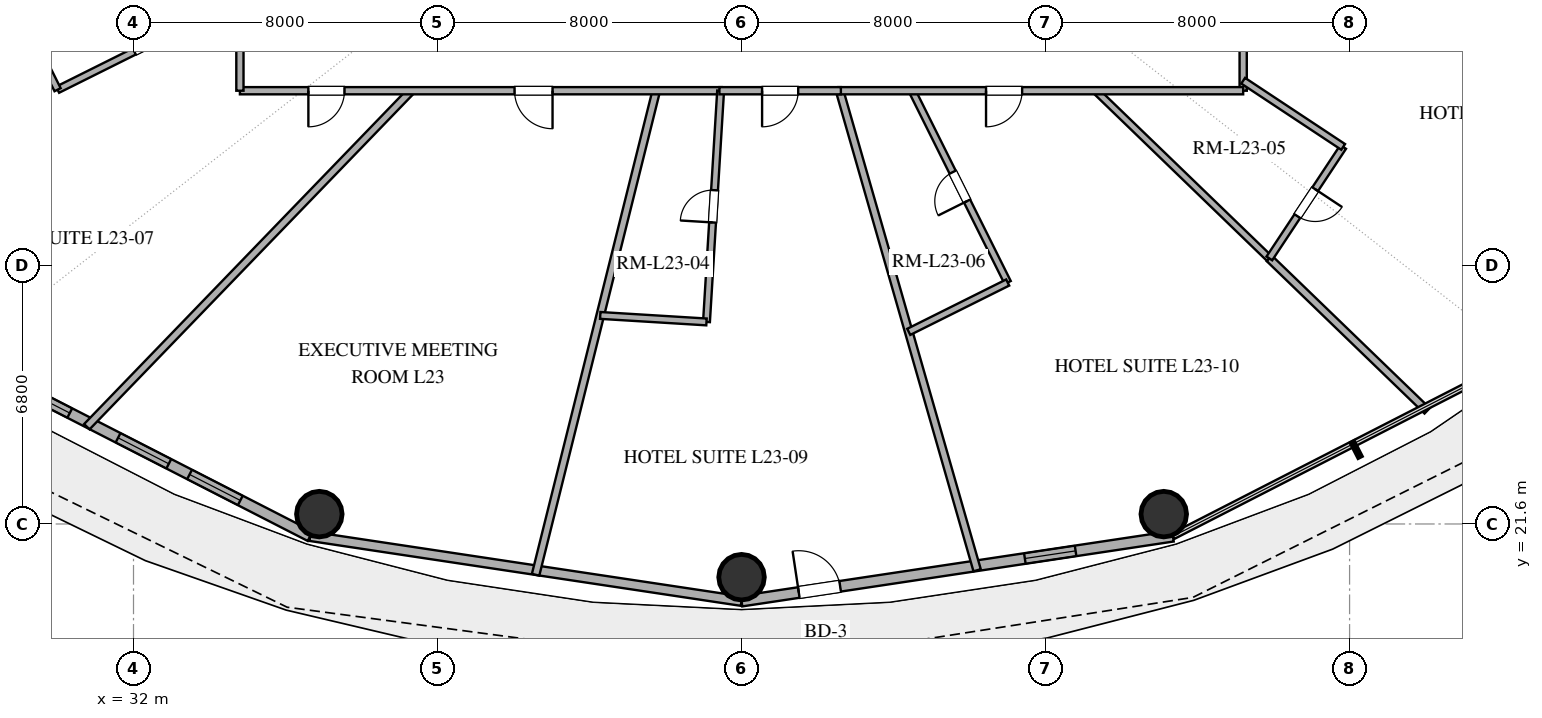
"""IFC4 building model, lengths in metres.
Left out: names, types, materials, properties, quantities, classifications, styles, units other than length and angle.
Written with IfcOpenShell. Run it as: python <this file> out.ifc"""

import sys

from ifc_helpers import new_model, si_unit, direction, frame, frame_2d, origin, origin_2d, place, context, subcontext, project, spatial, rectangle, hollow_circle, extrude, element, fill, save


model = new_model("IFC4")
c1 = context("Model", 3, precision=1e-05, world=origin(), true_north=direction((0.0, 1.0)))
c2 = subcontext(c1, "Body", "Model", "MODEL_VIEW")
j1 = project(units=[si_unit("LENGTHUNIT", "METRE"), si_unit("PLANEANGLEUNIT", "RADIAN")], contexts=[c1])
p1 = place(None, origin())
s1 = spatial("IfcSite", under=j1, at=p1, CompositionType="ELEMENT")
p2 = place(p1, origin())
s2 = spatial("IfcBuilding", under=s1, at=p2, CompositionType="ELEMENT")
p3 = place(p2, frame((0.0, 0.0, 94.8)))
s3 = spatial("IfcBuildingStorey", under=s2, at=p3, CompositionType="ELEMENT", Elevation=94.8)
for number, where, z_axis, x_axis in (
    (1, (36.89, 21.859, 0.0), (0.0, 0.0, 1.0), (1.0, 0.0, 0.0)),
    (2, (48.0, 20.2, 0.0), (0.0, 0.0, 1.0), (1.0, 0.0, 0.0)),
    (3, (59.11, 21.859, 0.0), (0.0, 0.0, 1.0), (1.0, 0.0, 0.0)),
):
    element("IfcColumn", number, at=place(p3, frame(where, z_axis=z_axis, x_axis=x_axis)), inside=s3, PredefinedType="COLUMN", context=c2, shape_type="SweptSolid", body=[
        extrude(hollow_circle(Radius=0.6, WallThickness=0.032, at=origin_2d()), origin(), (0.0, 0.0, 1.0), 3.38),
    ])
p4 = place(p3, frame((27.16, 26.14, 0.0), z_axis=(0.0, 0.0, 1.0), x_axis=(0.889959505023, -0.45603955905, 0.0)))
e4 = element("IfcWall", 4, at=p4, inside=s3, PredefinedType="SOLIDWALL", context=c2, shape_type="SweptSolid", body=[
    extrude(rectangle(XDim=10.662, YDim=0.28, at=frame_2d((5.331, 0.0))), origin(), (0.0, 0.0, 1.0), 3.38),
])
p5 = place(p4, frame((1.904, 0.0, 0.85)))
e5 = element("IfcOpeningElement", 5, at=p5, cuts=e4, PredefinedType="OPENING", context=c2, shape_type="SweptSolid", body=[
    extrude(rectangle(XDim=1.65, YDim=2.0, at=frame_2d((0.825, 1.0))), frame((0.0, 0.15, 0.0), z_axis=(0.0, -1.0, 0.0), x_axis=(1.0, 0.0, 0.0)), (0.0, 0.0, 1.0), 0.3),
])
p6 = place(p4, frame((4.982, 0.0, 0.85)))
e6 = element("IfcOpeningElement", 6, at=p6, cuts=e4, PredefinedType="OPENING", context=c2, shape_type="SweptSolid", body=[
    extrude(rectangle(XDim=1.5, YDim=2.0, at=frame_2d((0.75, 1.0))), frame((0.0, 0.15, 0.0), z_axis=(0.0, -1.0, 0.0), x_axis=(1.0, 0.0, 0.0)), (0.0, 0.0, 1.0), 0.3),
])
p7 = place(p4, frame((7.096, 0.0, 0.85)))
e7 = element("IfcOpeningElement", 7, at=p7, cuts=e4, PredefinedType="OPENING", context=c2, shape_type="SweptSolid", body=[
    extrude(rectangle(XDim=1.5, YDim=2.0, at=frame_2d((0.75, 1.0))), frame((0.0, 0.15, 0.0), z_axis=(0.0, -1.0, 0.0), x_axis=(1.0, 0.0, 0.0)), (0.0, 0.0, 1.0), 0.3),
])
p8 = place(p3, frame((36.649, 21.277, 0.0), z_axis=(0.0, 0.0, 1.0), x_axis=(0.988877774656, -0.148730450117, 0.0)))
e8 = element("IfcWall", 8, at=p8, inside=s3, PredefinedType="SOLIDWALL", context=c2, shape_type="SweptSolid", body=[
    extrude(rectangle(XDim=11.479, YDim=0.25, at=frame_2d((5.74, 0.0))), origin(), (0.0, 0.0, 1.0), 3.38),
])
p9 = place(p3, frame((48.0, 19.57, 0.0), z_axis=(0.0, 0.0, 1.0), x_axis=(0.988877774656, 0.148730450117, 0.0)))
e9 = element("IfcWall", 9, at=p9, inside=s3, PredefinedType="SOLIDWALL", context=c2, shape_type="SweptSolid", body=[
    extrude(rectangle(XDim=11.479, YDim=0.28, at=frame_2d((5.74, 0.0))), origin(), (0.0, 0.0, 1.0), 3.38),
])
p10 = place(p9, frame((1.524, 0.0, 0.0)))
e10 = element("IfcOpeningElement", 10, at=p10, cuts=e9, PredefinedType="OPENING", context=c2, shape_type="SweptSolid", body=[
    extrude(rectangle(XDim=1.1, YDim=2.25, at=frame_2d((0.55, 1.125))), frame((0.0, 0.15, 0.0), z_axis=(0.0, -1.0, 0.0), x_axis=(1.0, 0.0, 0.0)), (0.0, 0.0, 1.0), 0.3),
])
p11 = place(p9, frame((7.539, 0.0, 0.85)))
e11 = element("IfcOpeningElement", 11, at=p11, cuts=e9, PredefinedType="OPENING", context=c2, shape_type="SweptSolid", body=[
    extrude(rectangle(XDim=1.35, YDim=1.8, at=frame_2d((0.675, 0.9))), frame((0.0, 0.15, 0.0), z_axis=(0.0, -1.0, 0.0), x_axis=(1.0, 0.0, 0.0)), (0.0, 0.0, 1.0), 0.3),
])
p12 = place(p3, frame((30.772, 24.16, 0.0), z_axis=(0.0, 0.0, 1.0), x_axis=(0.694672506389, 0.719326149161, 0.0)))
e12 = element("IfcWall", 12, at=p12, inside=s3, PredefinedType="PARTITIONING", context=c2, shape_type="SweptSolid", body=[
    extrude(rectangle(XDim=12.289, YDim=0.2, at=frame_2d((6.145, 0.0))), origin(), (0.0, 0.0, 1.0), 2.74),
])
p13 = place(p3, frame((45.756, 33.0, 0.0), z_axis=(0.0, 0.0, 1.0), x_axis=(-0.241918476077, -0.970296578852, 0.0)))
e13 = element("IfcWall", 13, at=p13, inside=s3, PredefinedType="PARTITIONING", context=c2, shape_type="SweptSolid", body=[
    extrude(rectangle(XDim=13.125, YDim=0.2, at=frame_2d((6.563, 0.0))), origin(), (0.0, 0.0, 1.0), 2.74),
])
p14 = place(p3, frame((50.581, 33.0, 0.0), z_axis=(0.0, 0.0, 1.0), x_axis=(0.275639731411, -0.961261014745, 0.0)))
e14 = element("IfcWall", 14, at=p14, inside=s3, PredefinedType="PARTITIONING", context=c2, shape_type="SweptSolid", body=[
    extrude(rectangle(XDim=13.126, YDim=0.2, at=frame_2d((6.563, 0.0))), origin(), (0.0, 0.0, 1.0), 2.74),
])
p15 = place(p3, frame((47.482, 33.0, 0.0), z_axis=(0.0, 0.0, 1.0), x_axis=(-1.0, 0.0, 0.0)))
e15 = element("IfcWall", 15, at=p15, inside=s3, PredefinedType="PARTITIONING", context=c2, shape_type="SweptSolid", body=[
    extrude(rectangle(XDim=12.682, YDim=0.19, at=frame_2d((6.341, 0.0))), origin(), (0.0, 0.0, 1.0), 2.74),
])
p16 = place(p15, frame((4.455, 0.0, 0.0)))
e16 = element("IfcOpeningElement", 16, at=p16, cuts=e15, PredefinedType="OPENING", context=c2, shape_type="SweptSolid", body=[
    extrude(rectangle(XDim=1.0, YDim=2.2, at=frame_2d((0.5, 1.1))), frame((0.0, 0.105, 0.0), z_axis=(0.0, -1.0, 0.0), x_axis=(1.0, 0.0, 0.0)), (0.0, 0.0, 1.0), 0.21),
])
p17 = place(p15, frame((9.93, 0.0, 0.0)))
e17 = element("IfcOpeningElement", 17, at=p17, cuts=e15, PredefinedType="OPENING", context=c2, shape_type="SweptSolid", body=[
    extrude(rectangle(XDim=0.95, YDim=2.15, at=frame_2d((0.475, 1.075))), frame((0.0, 0.105, 0.0), z_axis=(0.0, -1.0, 0.0), x_axis=(1.0, 0.0, 0.0)), (0.0, 0.0, 1.0), 0.21),
])
p18 = place(p3, frame((61.889, 28.587, 0.0), z_axis=(0.0, 0.0, 1.0), x_axis=(-0.719318009274, 0.694680935059, 0.0)))
e18 = element("IfcWall", 18, at=p18, inside=s3, PredefinedType="PLUMBINGWALL", context=c2, shape_type="SweptSolid", body=[
    extrude(rectangle(XDim=6.352, YDim=0.18, at=frame_2d((3.176, 0.0))), origin(), (0.0, 0.0, 1.0), 2.74),
])
p19 = place(p3, frame((47.077, 26.916, 0.0), z_axis=(0.0, 0.0, 1.0), x_axis=(0.061044096749, 0.998135070144, 0.0)))
e19 = element("IfcWall", 19, at=p19, inside=s3, PredefinedType="PLUMBINGWALL", context=c2, shape_type="SweptSolid", body=[
    extrude(rectangle(XDim=6.095, YDim=0.18, at=frame_2d((3.048, 0.0))), origin(), (0.0, 0.0, 1.0), 2.74),
])
p20 = place(p19, frame((2.623, 0.0, 0.0)))
e20 = element("IfcOpeningElement", 20, at=p20, cuts=e19, PredefinedType="OPENING", context=c2, shape_type="SweptSolid", body=[
    extrude(rectangle(XDim=0.85, YDim=2.1, at=frame_2d((0.425, 1.05))), frame((0.0, 0.1, 0.0), z_axis=(0.0, -1.0, 0.0), x_axis=(1.0, 0.0, 0.0)), (0.0, 0.0, 1.0), 0.2),
])
p21 = place(p3, frame((66.041, 24.578, 0.0), z_axis=(0.0, 0.0, 1.0), x_axis=(-0.719370121813, 0.694626970281, 0.0)))
e21 = element("IfcWall", 21, at=p21, inside=s3, PredefinedType="PARTITIONING", context=c2, shape_type="SweptSolid", body=[
    extrude(rectangle(XDim=5.772, YDim=0.2, at=frame_2d((2.886, 0.0))), origin(), (0.0, 0.0, 1.0), 2.74),
])
p22 = place(p3, frame((55.003, 27.953, 0.0), z_axis=(0.0, 0.0, 1.0), x_axis=(-0.446174269641, 0.894946099556, 0.0)))
e22 = element("IfcWall", 22, at=p22, inside=s3, PredefinedType="PLUMBINGWALL", context=c2, shape_type="SweptSolid", body=[
    extrude(rectangle(XDim=5.639, YDim=0.18, at=frame_2d((2.82, 0.0))), origin(), (0.0, 0.0, 1.0), 2.74),
])
p23 = place(p22, frame((2.395, 0.0, 0.0)))
e23 = element("IfcOpeningElement", 23, at=p23, cuts=e22, PredefinedType="OPENING", context=c2, shape_type="SweptSolid", body=[
    extrude(rectangle(XDim=0.85, YDim=2.1, at=frame_2d((0.425, 1.05))), frame((0.0, 0.1, 0.0), z_axis=(0.0, -1.0, 0.0), x_axis=(1.0, 0.0, 0.0)), (0.0, 0.0, 1.0), 0.2),
])
p24 = place(p3, frame((61.2, 41.225, 0.0), z_axis=(0.0, 0.0, 1.0), x_axis=(0.0, -1.0, 0.0)))
e24 = element("IfcWall", 24, at=p24, inside=s3, PredefinedType="PARTITIONING", context=c2, shape_type="SweptSolid", body=[
    extrude(rectangle(XDim=8.225, YDim=0.19, at=frame_2d((4.112, 0.0))), origin(), (0.0, 0.0, 1.0), 2.74),
])
p25 = place(p24, frame((4.767, 0.0, 0.0)))
e25 = element("IfcOpeningElement", 25, at=p25, cuts=e24, PredefinedType="OPENING", context=c2, shape_type="SweptSolid", body=[
    extrude(rectangle(XDim=0.95, YDim=2.15, at=frame_2d((0.475, 1.075))), frame((0.0, 0.105, 0.0), z_axis=(0.0, -1.0, 0.0), x_axis=(1.0, 0.0, 0.0)), (0.0, 0.0, 1.0), 0.21),
])
p26 = place(p3, frame((30.002, 33.027, 0.0), z_axis=(0.0, 0.0, 1.0), x_axis=(0.894936648514, 0.446193226244, 0.0)))
e26 = element("IfcWall", 26, at=p26, inside=s3, PredefinedType="PLUMBINGWALL", context=c2, shape_type="SweptSolid", body=[
    extrude(rectangle(XDim=5.361, YDim=0.18, at=frame_2d((2.681, 0.0))), origin(), (0.0, 0.0, 1.0), 2.74),
])
p27 = place(p26, frame((2.256, 0.0, 0.0)))
e27 = element("IfcOpeningElement", 27, at=p27, cuts=e26, PredefinedType="OPENING", context=c2, shape_type="SweptSolid", body=[
    extrude(rectangle(XDim=0.85, YDim=2.1, at=frame_2d((0.425, 1.05))), frame((0.0, 0.1, 0.0), z_axis=(0.0, -1.0, 0.0), x_axis=(1.0, 0.0, 0.0)), (0.0, 0.0, 1.0), 0.2),
])
p28 = place(p3, frame((61.2, 33.0, 0.0), z_axis=(0.0, 0.0, 1.0), x_axis=(-1.0, 0.0, 0.0)))
e28 = element("IfcWall", 28, at=p28, inside=s3, PredefinedType="PARTITIONING", context=c2, shape_type="SweptSolid", body=[
    extrude(rectangle(XDim=10.653, YDim=0.19, at=frame_2d((5.326, 0.0))), origin(), (0.0, 0.0, 1.0), 2.74),
])
p29 = place(p28, frame((5.816, 0.0, 0.0)))
e29 = element("IfcOpeningElement", 29, at=p29, cuts=e28, PredefinedType="OPENING", context=c2, shape_type="SweptSolid", body=[
    extrude(rectangle(XDim=0.95, YDim=2.15, at=frame_2d((0.475, 1.075))), frame((0.0, 0.105, 0.0), z_axis=(0.0, -1.0, 0.0), x_axis=(1.0, 0.0, 0.0)), (0.0, 0.0, 1.0), 0.21),
])
p30 = place(p3, frame((34.8, 33.0, 0.0), z_axis=(0.0, 0.0, 1.0), x_axis=(0.0, 1.0, 0.0)))
e30 = element("IfcWall", 30, at=p30, inside=s3, PredefinedType="PARTITIONING", context=c2, shape_type="SweptSolid", body=[
    extrude(rectangle(XDim=9.839, YDim=0.19, at=frame_2d((4.92, 0.0))), origin(), (0.0, 0.0, 1.0), 2.74),
])
p31 = place(p30, frame((7.035, 0.0, 0.0)))
e31 = element("IfcOpeningElement", 31, at=p31, cuts=e30, PredefinedType="OPENING", context=c2, shape_type="SweptSolid", body=[
    extrude(rectangle(XDim=0.95, YDim=2.15, at=frame_2d((0.475, 1.075))), frame((0.0, 0.105, 0.0), z_axis=(0.0, -1.0, 0.0), x_axis=(1.0, 0.0, 0.0)), (0.0, 0.0, 1.0), 0.21),
])
p32 = place(p3, frame((28.339, 36.362, 0.0), z_axis=(0.0, 0.0, 1.0), x_axis=(0.446243949247, -0.894911357488, 0.0)))
e32 = element("IfcWall", 32, at=p32, inside=s3, PredefinedType="PLUMBINGWALL", context=c2, shape_type="SweptSolid", body=[
    extrude(rectangle(XDim=3.727, YDim=0.18, at=frame_2d((1.864, 0.0))), origin(), (0.0, 0.0, 1.0), 2.74),
])
p33 = place(p3, frame((63.831, 31.521, 0.0), z_axis=(0.0, 0.0, 1.0), x_axis=(-0.551959146688, -0.833871153349, 0.0)))
e33 = element("IfcWall", 33, at=p33, inside=s3, PredefinedType="PLUMBINGWALL", context=c2, shape_type="SweptSolid", body=[
    extrude(rectangle(XDim=3.519, YDim=0.18, at=frame_2d((1.759, 0.0))), origin(), (0.0, 0.0, 1.0), 2.74),
])
p34 = place(p33, frame((1.334, 0.0, 0.0)))
e34 = element("IfcOpeningElement", 34, at=p34, cuts=e33, PredefinedType="OPENING", context=c2, shape_type="SweptSolid", body=[
    extrude(rectangle(XDim=0.85, YDim=2.1, at=frame_2d((0.425, 1.05))), frame((0.0, 0.1, 0.0), z_axis=(0.0, -1.0, 0.0), x_axis=(1.0, 0.0, 0.0)), (0.0, 0.0, 1.0), 0.2),
])
p35 = place(p3, frame((50.614, 33.0, 0.0), z_axis=(0.0, 0.0, 1.0), x_axis=(-1.0, 0.0, 0.0)))
e35 = element("IfcWall", 35, at=p35, inside=s3, PredefinedType="PARTITIONING", context=c2, shape_type="SweptSolid", body=[
    extrude(rectangle(XDim=3.197, YDim=0.19, at=frame_2d((1.598, 0.0))), origin(), (0.0, 0.0, 1.0), 2.74),
])
p36 = place(p35, frame((1.123, 0.0, 0.0)))
e36 = element("IfcOpeningElement", 36, at=p36, cuts=e35, PredefinedType="OPENING", context=c2, shape_type="SweptSolid", body=[
    extrude(rectangle(XDim=0.95, YDim=2.15, at=frame_2d((0.475, 1.075))), frame((0.0, 0.105, 0.0), z_axis=(0.0, -1.0, 0.0), x_axis=(1.0, 0.0, 0.0)), (0.0, 0.0, 1.0), 0.21),
])
p37 = place(p3, frame((61.2, 33.263, 0.0), z_axis=(0.0, 0.0, 1.0), x_axis=(0.833855219674, -0.5519832177, 0.0)))
e37 = element("IfcWall", 37, at=p37, inside=s3, PredefinedType="PLUMBINGWALL", context=c2, shape_type="SweptSolid", body=[
    extrude(rectangle(XDim=3.155, YDim=0.18, at=frame_2d((1.578, 0.0))), origin(), (0.0, 0.0, 1.0), 2.74),
])
p38 = place(p3, frame((52.4, 26.655, 0.0), z_axis=(0.0, 0.0, 1.0), x_axis=(0.894913437672, 0.446239777558, 0.0)))
e38 = element("IfcWall", 38, at=p38, inside=s3, PredefinedType="PLUMBINGWALL", context=c2, shape_type="SweptSolid", body=[
    extrude(rectangle(XDim=2.909, YDim=0.18, at=frame_2d((1.455, 0.0))), origin(), (0.0, 0.0, 1.0), 2.74),
])
p39 = place(p3, frame((44.282, 27.087, 0.0), z_axis=(0.0, 0.0, 1.0), x_axis=(0.998136779925, -0.061016133608, 0.0)))
e39 = element("IfcWall", 39, at=p39, inside=s3, PredefinedType="PLUMBINGWALL", context=c2, shape_type="SweptSolid", body=[
    extrude(rectangle(XDim=2.801, YDim=0.18, at=frame_2d((1.4, 0.0))), origin(), (0.0, 0.0, 1.0), 2.74),
])
p40 = place(p5, origin())
e40 = element("IfcWindow", 40, at=p40, inside=s3, PartitioningType="SINGLE_PANEL", PredefinedType="WINDOW", context=c2, shape_type="SweptSolid", body=[
    extrude(rectangle(XDim=1.65, YDim=2.0, at=frame_2d((0.825, 1.0))), frame((0.0, 0.03, 0.0), z_axis=(0.0, -1.0, 0.0), x_axis=(1.0, 0.0, 0.0)), (0.0, 0.0, 1.0), 0.06),
])
fill(e5, e40)
p41 = place(p6, origin())
e41 = element("IfcWindow", 41, at=p41, inside=s3, PartitioningType="SINGLE_PANEL", PredefinedType="WINDOW", context=c2, shape_type="SweptSolid", body=[
    extrude(rectangle(XDim=1.5, YDim=2.0, at=frame_2d((0.75, 1.0))), frame((0.0, 0.03, 0.0), z_axis=(0.0, -1.0, 0.0), x_axis=(1.0, 0.0, 0.0)), (0.0, 0.0, 1.0), 0.06),
])
fill(e6, e41)
p42 = place(p7, origin())
e42 = element("IfcWindow", 42, at=p42, inside=s3, PartitioningType="SINGLE_PANEL", PredefinedType="WINDOW", context=c2, shape_type="SweptSolid", body=[
    extrude(rectangle(XDim=1.5, YDim=2.0, at=frame_2d((0.75, 1.0))), frame((0.0, 0.03, 0.0), z_axis=(0.0, -1.0, 0.0), x_axis=(1.0, 0.0, 0.0)), (0.0, 0.0, 1.0), 0.06),
])
fill(e7, e42)
p43 = place(p10, origin())
e43 = element("IfcDoor", 43, at=p43, inside=s3, OperationType="SINGLE_SWING_LEFT", PredefinedType="DOOR", context=c2, shape_type="SweptSolid", body=[
    extrude(rectangle(XDim=1.1, YDim=2.25, at=frame_2d((0.55, 1.125))), frame((0.0, 0.025, 0.0), z_axis=(0.0, -1.0, 0.0), x_axis=(1.0, 0.0, 0.0)), (0.0, 0.0, 1.0), 0.05),
])
fill(e10, e43)
p44 = place(p11, origin())
e44 = element("IfcWindow", 44, at=p44, inside=s3, PartitioningType="SINGLE_PANEL", PredefinedType="WINDOW", context=c2, shape_type="SweptSolid", body=[
    extrude(rectangle(XDim=1.35, YDim=1.8, at=frame_2d((0.675, 0.9))), frame((0.0, 0.03, 0.0), z_axis=(0.0, -1.0, 0.0), x_axis=(1.0, 0.0, 0.0)), (0.0, 0.0, 1.0), 0.06),
])
fill(e11, e44)
p45 = place(p16, origin())
e45 = element("IfcDoor", 45, at=p45, inside=s3, OperationType="SINGLE_SWING_LEFT", PredefinedType="DOOR", context=c2, shape_type="SweptSolid", body=[
    extrude(rectangle(XDim=1.0, YDim=2.2, at=frame_2d((0.5, 1.1))), frame((0.0, 0.025, 0.0), z_axis=(0.0, -1.0, 0.0), x_axis=(1.0, 0.0, 0.0)), (0.0, 0.0, 1.0), 0.05),
])
fill(e16, e45)
p46 = place(p17, origin())
e46 = element("IfcDoor", 46, at=p46, inside=s3, OperationType="SINGLE_SWING_RIGHT", PredefinedType="DOOR", context=c2, shape_type="SweptSolid", body=[
    extrude(rectangle(XDim=0.95, YDim=2.15, at=frame_2d((0.475, 1.075))), frame((0.0, 0.025, 0.0), z_axis=(0.0, -1.0, 0.0), x_axis=(1.0, 0.0, 0.0)), (0.0, 0.0, 1.0), 0.05),
])
fill(e17, e46)
p47 = place(p20, origin())
e47 = element("IfcDoor", 47, at=p47, inside=s3, OperationType="SINGLE_SWING_LEFT", PredefinedType="DOOR", context=c2, shape_type="SweptSolid", body=[
    extrude(rectangle(XDim=0.85, YDim=2.1, at=frame_2d((0.425, 1.05))), frame((0.0, 0.025, 0.0), z_axis=(0.0, -1.0, 0.0), x_axis=(1.0, 0.0, 0.0)), (0.0, 0.0, 1.0), 0.05),
])
fill(e20, e47)
p48 = place(p23, origin())
e48 = element("IfcDoor", 48, at=p48, inside=s3, OperationType="SINGLE_SWING_LEFT", PredefinedType="DOOR", context=c2, shape_type="SweptSolid", body=[
    extrude(rectangle(XDim=0.85, YDim=2.1, at=frame_2d((0.425, 1.05))), frame((0.0, 0.025, 0.0), z_axis=(0.0, -1.0, 0.0), x_axis=(1.0, 0.0, 0.0)), (0.0, 0.0, 1.0), 0.05),
])
fill(e23, e48)
p49 = place(p29, origin())
e49 = element("IfcDoor", 49, at=p49, inside=s3, OperationType="SINGLE_SWING_RIGHT", PredefinedType="DOOR", context=c2, shape_type="SweptSolid", body=[
    extrude(rectangle(XDim=0.95, YDim=2.15, at=frame_2d((0.475, 1.075))), frame((0.0, 0.025, 0.0), z_axis=(0.0, -1.0, 0.0), x_axis=(1.0, 0.0, 0.0)), (0.0, 0.0, 1.0), 0.05),
])
fill(e29, e49)
p50 = place(p34, origin())
e50 = element("IfcDoor", 50, at=p50, inside=s3, OperationType="SINGLE_SWING_LEFT", PredefinedType="DOOR", context=c2, shape_type="SweptSolid", body=[
    extrude(rectangle(XDim=0.85, YDim=2.1, at=frame_2d((0.425, 1.05))), frame((0.0, 0.025, 0.0), z_axis=(0.0, -1.0, 0.0), x_axis=(1.0, 0.0, 0.0)), (0.0, 0.0, 1.0), 0.05),
])
fill(e34, e50)
p51 = place(p36, origin())
e51 = element("IfcDoor", 51, at=p51, inside=s3, OperationType="SINGLE_SWING_RIGHT", PredefinedType="DOOR", context=c2, shape_type="SweptSolid", body=[
    extrude(rectangle(XDim=0.95, YDim=2.15, at=frame_2d((0.475, 1.075))), frame((0.0, 0.025, 0.0), z_axis=(0.0, -1.0, 0.0), x_axis=(1.0, 0.0, 0.0)), (0.0, 0.0, 1.0), 0.05),
])
fill(e36, e51)
save(model, sys.argv[1])
